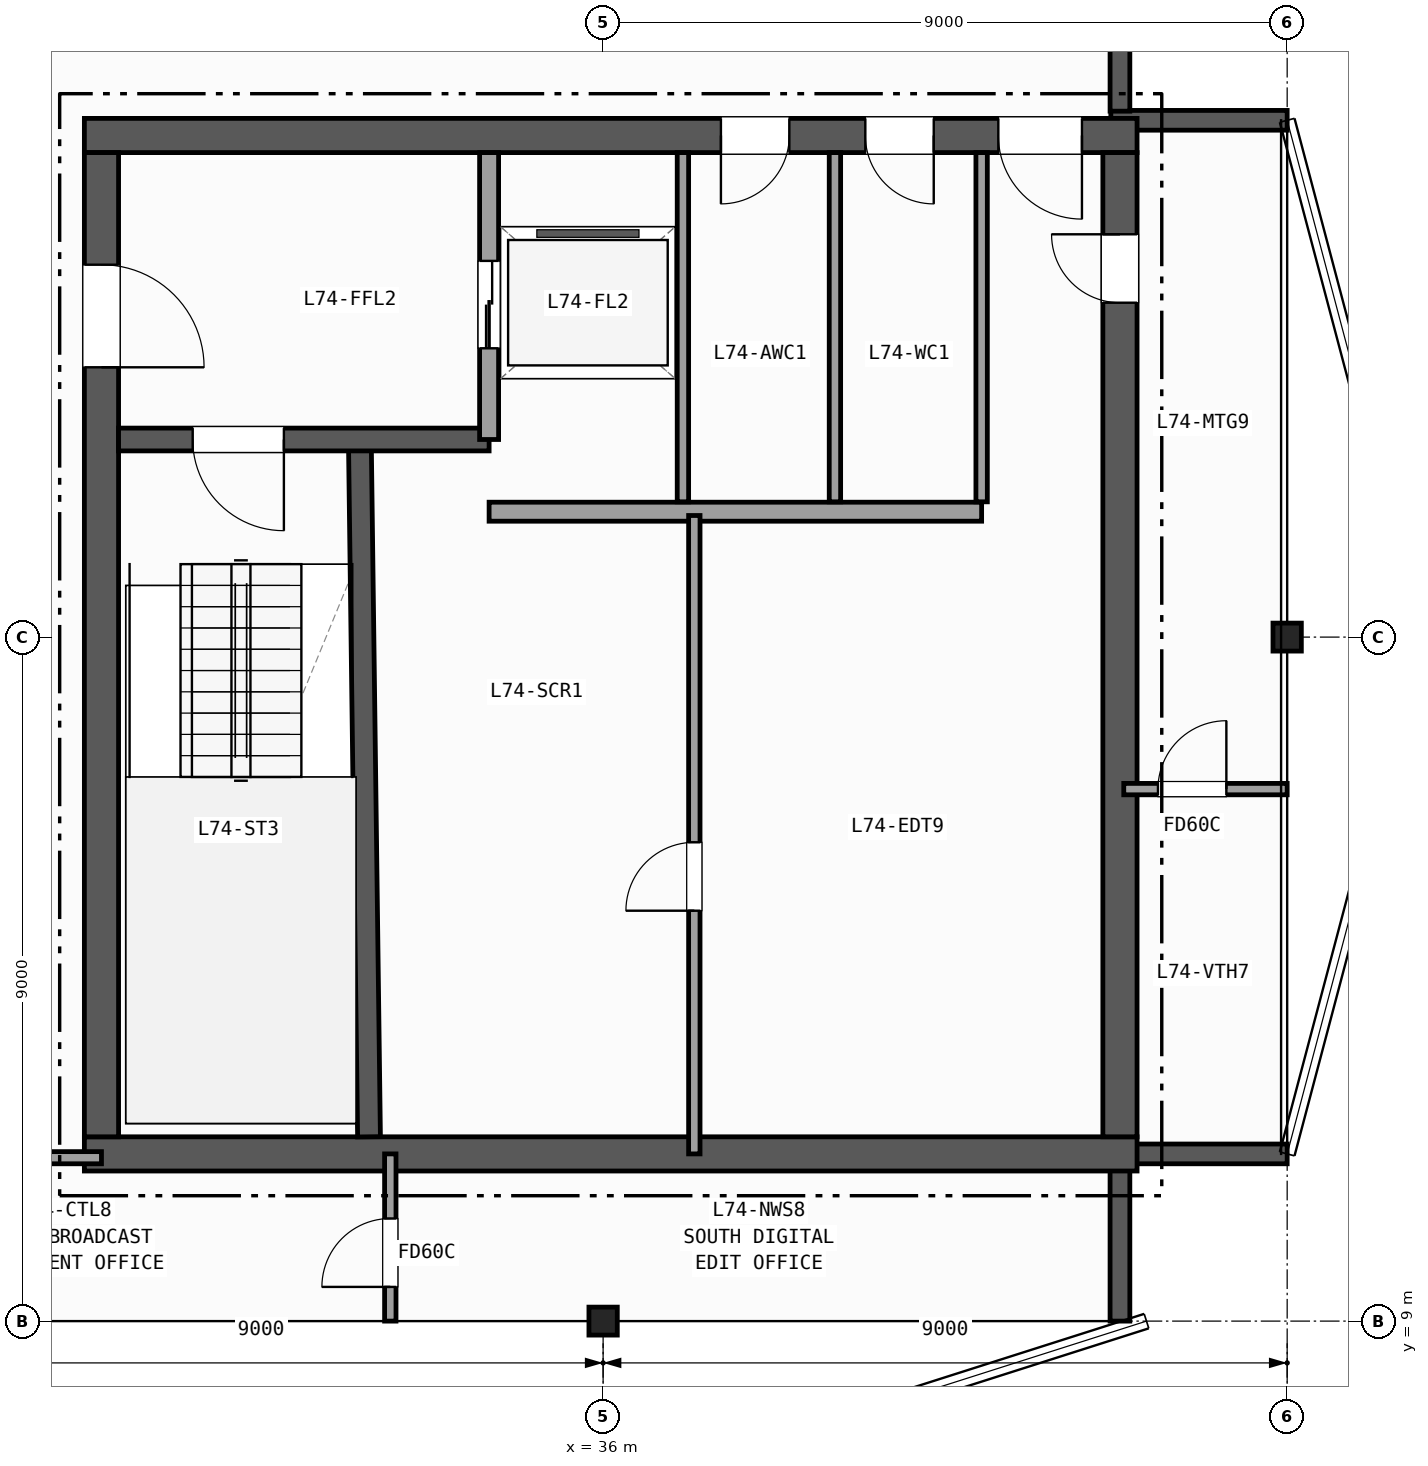
"""IFC4 building model, lengths in metres.
Left out: names, types, materials, properties, quantities, classifications, styles, units other than length and angle.
Written with IfcOpenShell. Run it as: python <this file> out.ifc"""

import sys

from ifc_helpers import new_model, si_unit, direction, frame, frame_2d, origin, origin_2d, place, context, subcontext, project, spatial, rectangle, i_section, extrude, element, fill, save


model = new_model("IFC4")
c1 = context("Model", 3, precision=1e-05, world=origin(), true_north=direction((0.0, 1.0)))
c2 = subcontext(c1, "Body", "Model", "MODEL_VIEW")
j1 = project(units=[si_unit("LENGTHUNIT", "METRE"), si_unit("PLANEANGLEUNIT", "RADIAN")], contexts=[c1])
p1 = place(None, origin())
s1 = spatial("IfcSite", under=j1, at=p1, CompositionType="ELEMENT")
p2 = place(p1, origin())
s2 = spatial("IfcBuilding", under=s1, at=p2, CompositionType="ELEMENT")
p3 = place(p2, frame((0.0, 0.0, 293.7)))
s3 = spatial("IfcBuildingStorey", under=s2, at=p3, CompositionType="ELEMENT", Elevation=293.7)
for number, where, z_axis, x_axis in (
    (1, (36.0, 9.0, 0.0), (0.0, 0.0, 1.0), (1.0, 0.0, 0.0)),
    (2, (45.0, 18.0, 0.0), (0.0, 0.0, 1.0), (1.0, 0.0, 0.0)),
):
    element("IfcColumn", number, at=place(p3, frame(where, z_axis=z_axis, x_axis=x_axis)), inside=s3, PredefinedType="COLUMN", context=c2, shape_type="SweptSolid", body=[
        extrude(i_section(OverallWidth=0.373, OverallDepth=0.368, WebThickness=0.015, FlangeThickness=0.024, FilletRadius=0.015, at=origin_2d()), origin(), (0.0, 0.0, 1.0), 3.7),
    ])
p4 = place(p3, frame((42.8, 9.0, 0.0), z_axis=(0.0, 0.0, 1.0), x_axis=(0.0, 1.0, 0.0)))
e3 = element("IfcWall", 3, at=p4, inside=s3, PredefinedType="SOLIDWALL", context=c2, shape_type="SweptSolid", body=[
    extrude(rectangle(XDim=2.08, YDim=0.26, at=frame_2d((1.04, 0.0))), origin(), (0.0, 0.0, 1.0), 3.37),
])
for number, where, z_axis, x_axis in (
    (4, (42.68, 11.2, 0.0), (0.0, 0.0, 1.0), (1.0, 0.0, 0.0)),
    (5, (45.0, 24.8, 0.0), (0.0, 0.0, 1.0), (-1.0, 0.0, 0.0)),
):
    element("IfcWall", number, at=place(p3, frame(where, z_axis=z_axis, x_axis=x_axis)), inside=s3, PredefinedType="SOLIDWALL", context=c2, shape_type="SweptSolid", body=[
        extrude(rectangle(XDim=2.32, YDim=0.26, at=frame_2d((1.16, 0.0))), origin(), (0.0, 0.0, 1.0), 3.37),
    ])
p5 = place(p3, frame((42.8, 24.92, 0.0), z_axis=(0.0, 0.0, 1.0), x_axis=(0.0, 1.0, 0.0)))
e6 = element("IfcWall", 6, at=p5, inside=s3, PredefinedType="SOLIDWALL", context=c2, shape_type="SweptSolid", body=[
    extrude(rectangle(XDim=2.08, YDim=0.26, at=frame_2d((1.04, 0.0))), origin(), (0.0, 0.0, 1.0), 3.37),
])
p6 = place(p3, frame((29.175, 11.2, 0.0), z_axis=(0.0, 0.0, 1.0), x_axis=(1.0, 0.0, 0.0)))
e7 = element("IfcWall", 7, at=p6, inside=s3, PredefinedType="SHEAR", context=c2, shape_type="SweptSolid", body=[
    extrude(rectangle(XDim=13.85, YDim=0.45, at=frame_2d((6.925, 0.0))), origin(), (0.0, 0.0, 1.0), 3.37),
])
p7 = place(p3, frame((43.025, 24.6, 0.0), z_axis=(0.0, 0.0, 1.0), x_axis=(-1.0, 0.0, 0.0)))
e8 = element("IfcWall", 8, at=p7, inside=s3, PredefinedType="SHEAR", context=c2, shape_type="SweptSolid", body=[
    extrude(rectangle(XDim=13.85, YDim=0.45, at=frame_2d((6.925, 0.0))), origin(), (0.0, 0.0, 1.0), 3.37),
])
p8 = place(p7, frame((0.725, 0.0, 0.0)))
e9 = element("IfcOpeningElement", 9, at=p8, cuts=e8, PredefinedType="OPENING", context=c2, shape_type="SweptSolid", body=[
    extrude(rectangle(XDim=1.1, YDim=2.15, at=frame_2d((0.55, 1.075))), frame((0.0, 0.235, 0.0), z_axis=(0.0, -1.0, 0.0), x_axis=(1.0, 0.0, 0.0)), (0.0, 0.0, 1.0), 0.47),
])
p9 = place(p7, frame((2.675, 0.0, 0.0)))
e10 = element("IfcOpeningElement", 10, at=p9, cuts=e8, PredefinedType="OPENING", context=c2, shape_type="SweptSolid", body=[
    extrude(rectangle(XDim=0.9, YDim=2.1, at=frame_2d((0.45, 1.05))), frame((0.0, 0.235, 0.0), z_axis=(0.0, -1.0, 0.0), x_axis=(1.0, 0.0, 0.0)), (0.0, 0.0, 1.0), 0.47),
])
p10 = place(p7, frame((4.575, 0.0, 0.0)))
e11 = element("IfcOpeningElement", 11, at=p10, cuts=e8, PredefinedType="OPENING", context=c2, shape_type="SweptSolid", body=[
    extrude(rectangle(XDim=0.9, YDim=2.1, at=frame_2d((0.45, 1.05))), frame((0.0, 0.235, 0.0), z_axis=(0.0, -1.0, 0.0), x_axis=(1.0, 0.0, 0.0)), (0.0, 0.0, 1.0), 0.47),
])
p11 = place(p3, frame((29.4, 24.375, 0.0), z_axis=(0.0, 0.0, 1.0), x_axis=(0.0, -1.0, 0.0)))
e12 = element("IfcWall", 12, at=p11, inside=s3, PredefinedType="SHEAR", context=c2, shape_type="SweptSolid", body=[
    extrude(rectangle(XDim=12.95, YDim=0.45, at=frame_2d((6.475, 0.0))), origin(), (0.0, 0.0, 1.0), 3.37),
])
p12 = place(p11, frame((1.475, 0.0, 0.0)))
e13 = element("IfcOpeningElement", 13, at=p12, cuts=e12, PredefinedType="OPENING", context=c2, shape_type="SweptSolid", body=[
    extrude(rectangle(XDim=1.35, YDim=2.15, at=frame_2d((0.675, 1.075))), frame((0.0, 0.235, 0.0), z_axis=(0.0, -1.0, 0.0), x_axis=(1.0, 0.0, 0.0)), (0.0, 0.0, 1.0), 0.47),
])
p13 = place(p3, frame((42.8, 11.425, 0.0), z_axis=(0.0, 0.0, 1.0), x_axis=(0.0, 1.0, 0.0)))
e14 = element("IfcWall", 14, at=p13, inside=s3, PredefinedType="SHEAR", context=c2, shape_type="SweptSolid", body=[
    extrude(rectangle(XDim=12.95, YDim=0.45, at=frame_2d((6.475, 0.0))), origin(), (0.0, 0.0, 1.0), 3.37),
])
p14 = place(p13, frame((10.975, 0.0, 0.0)))
e15 = element("IfcOpeningElement", 15, at=p14, cuts=e14, PredefinedType="OPENING", context=c2, shape_type="SweptSolid", body=[
    extrude(rectangle(XDim=0.9, YDim=2.1, at=frame_2d((0.45, 1.05))), frame((0.0, 0.235, 0.0), z_axis=(0.0, -1.0, 0.0), x_axis=(1.0, 0.0, 0.0)), (0.0, 0.0, 1.0), 0.47),
])
p15 = place(p3, frame((32.92, 11.425, 0.0), z_axis=(0.0, 0.0, 1.0), x_axis=(-0.013135638869, 0.999913723774, 0.0)))
e16 = element("IfcWall", 16, at=p15, inside=s3, PredefinedType="SHEAR", context=c2, shape_type="SweptSolid", body=[
    extrude(rectangle(XDim=9.126, YDim=0.3, at=frame_2d((4.563, 0.0))), origin(), (0.0, 0.0, 1.0), 3.37),
])
p16 = place(p3, frame((34.5, 20.6, 0.0), z_axis=(0.0, 0.0, 1.0), x_axis=(-1.0, 0.0, 0.0)))
e17 = element("IfcWall", 17, at=p16, inside=s3, PredefinedType="SHEAR", context=c2, shape_type="SweptSolid", body=[
    extrude(rectangle(XDim=4.875, YDim=0.3, at=frame_2d((2.438, 0.0))), origin(), (0.0, 0.0, 1.0), 3.37),
])
p17 = place(p16, frame((2.7, 0.0, 0.0)))
e18 = element("IfcOpeningElement", 18, at=p17, cuts=e17, PredefinedType="OPENING", context=c2, shape_type="SweptSolid", body=[
    extrude(rectangle(XDim=1.2, YDim=2.15, at=frame_2d((0.6, 1.075))), frame((0.0, 0.16, 0.0), z_axis=(0.0, -1.0, 0.0), x_axis=(1.0, 0.0, 0.0)), (0.0, 0.0, 1.0), 0.32),
])
p18 = place(p3, frame((34.5, 20.6, 0.0), z_axis=(0.0, 0.0, 1.0), x_axis=(0.0, 1.0, 0.0)))
e19 = element("IfcWall", 19, at=p18, inside=s3, PredefinedType="PARTITIONING", context=c2, shape_type="SweptSolid", body=[
    extrude(rectangle(XDim=3.775, YDim=0.25, at=frame_2d((1.887, 0.0))), origin(), (0.0, 0.0, 1.0), 3.37),
])
p19 = place(p18, frame((1.2, 0.0, 0.0)))
e20 = element("IfcOpeningElement", 20, at=p19, cuts=e19, PredefinedType="OPENING", context=c2, shape_type="SweptSolid", body=[
    extrude(rectangle(XDim=1.15, YDim=2.15, at=frame_2d((0.575, 1.075))), frame((0.0, 0.135, 0.0), z_axis=(0.0, -1.0, 0.0), x_axis=(1.0, 0.0, 0.0)), (0.0, 0.0, 1.0), 0.27),
])
p20 = place(p3, frame((34.5, 19.65, 0.0), z_axis=(0.0, 0.0, 1.0), x_axis=(1.0, 0.0, 0.0)))
e21 = element("IfcWall", 21, at=p20, inside=s3, PredefinedType="PARTITIONING", context=c2, shape_type="SweptSolid", body=[
    extrude(rectangle(XDim=6.48, YDim=0.25, at=frame_2d((3.24, 0.0))), origin(), (0.0, 0.0, 1.0), 3.37),
])
p21 = place(p3, frame((37.2, 11.2, 0.0), z_axis=(0.0, 0.0, 1.0), x_axis=(0.0, 1.0, 0.0)))
e22 = element("IfcWall", 22, at=p21, inside=s3, PredefinedType="PARTITIONING", context=c2, shape_type="SweptSolid", body=[
    extrude(rectangle(XDim=8.4, YDim=0.15, at=frame_2d((4.2, 0.0))), origin(), (0.0, 0.0, 1.0), 3.37),
])
p22 = place(p21, frame((3.2, 0.0, 0.0)))
e23 = element("IfcOpeningElement", 23, at=p22, cuts=e22, PredefinedType="OPENING", context=c2, shape_type="SweptSolid", body=[
    extrude(rectangle(XDim=0.9, YDim=2.1, at=frame_2d((0.45, 1.05))), frame((0.0, 0.085, 0.0), z_axis=(0.0, -1.0, 0.0), x_axis=(1.0, 0.0, 0.0)), (0.0, 0.0, 1.0), 0.17),
])
for number, where, z_axis, x_axis in (
    (24, (37.05, 19.78, 0.0), (0.0, 0.0, 1.0), (0.0, 1.0, 0.0)),
    (25, (39.05, 19.78, 0.0), (0.0, 0.0, 1.0), (0.0, 1.0, 0.0)),
    (26, (40.98, 19.78, 0.0), (0.0, 0.0, 1.0), (0.0, 1.0, 0.0)),
):
    element("IfcWall", number, at=place(p3, frame(where, z_axis=z_axis, x_axis=x_axis)), inside=s3, PredefinedType="PARTITIONING", context=c2, shape_type="SweptSolid", body=[
        extrude(rectangle(XDim=4.595, YDim=0.15, at=frame_2d((2.297, 0.0))), origin(), (0.0, 0.0, 1.0), 3.37),
    ])
p23 = place(p3, frame((24.65, 11.15, 0.0), z_axis=(0.0, 0.0, 1.0), x_axis=(1.0, 0.0, 0.0)))
e27 = element("IfcWall", 27, at=p23, inside=s3, PredefinedType="PARTITIONING", context=c2, shape_type="SweptSolid", body=[
    extrude(rectangle(XDim=4.75, YDim=0.16, at=frame_2d((2.375, 0.0))), origin(), (0.0, 0.0, 1.0), 2.742),
])
p24 = place(p23, frame((1.2, 0.0, 0.0)))
e28 = element("IfcOpeningElement", 28, at=p24, cuts=e27, PredefinedType="OPENING", context=c2, shape_type="SweptSolid", body=[
    extrude(rectangle(XDim=1.05, YDim=2.15, at=frame_2d((0.525, 1.075))), frame((0.0, 0.09, 0.0), z_axis=(0.0, -1.0, 0.0), x_axis=(1.0, 0.0, 0.0)), (0.0, 0.0, 1.0), 0.18),
])
p25 = place(p3, frame((33.2, 9.0, 0.0), z_axis=(0.0, 0.0, 1.0), x_axis=(0.0, 1.0, 0.0)))
e29 = element("IfcWall", 29, at=p25, inside=s3, PredefinedType="PARTITIONING", context=c2, shape_type="SweptSolid", body=[
    extrude(rectangle(XDim=2.2, YDim=0.15, at=frame_2d((1.1, 0.0))), origin(), (0.0, 0.0, 1.0), 2.657),
])
p26 = place(p25, frame((0.45, 0.0, 0.0)))
e30 = element("IfcOpeningElement", 30, at=p26, cuts=e29, PredefinedType="OPENING", context=c2, shape_type="SweptSolid", body=[
    extrude(rectangle(XDim=0.9, YDim=2.1, at=frame_2d((0.45, 1.05))), frame((0.0, 0.085, 0.0), z_axis=(0.0, -1.0, 0.0), x_axis=(1.0, 0.0, 0.0)), (0.0, 0.0, 1.0), 0.17),
])
p27 = place(p3, frame((42.85, 16.0, 0.0), z_axis=(0.0, 0.0, 1.0), x_axis=(1.0, 0.0, 0.0)))
e31 = element("IfcWall", 31, at=p27, inside=s3, PredefinedType="PARTITIONING", context=c2, shape_type="SweptSolid", body=[
    extrude(rectangle(XDim=2.15, YDim=0.15, at=frame_2d((1.075, 0.0))), origin(), (0.0, 0.0, 1.0), 3.37),
])
p28 = place(p27, frame((0.45, 0.0, 0.0)))
e32 = element("IfcOpeningElement", 32, at=p28, cuts=e31, PredefinedType="OPENING", context=c2, shape_type="SweptSolid", body=[
    extrude(rectangle(XDim=0.9, YDim=2.1, at=frame_2d((0.45, 1.05))), frame((0.0, 0.085, 0.0), z_axis=(0.0, -1.0, 0.0), x_axis=(1.0, 0.0, 0.0)), (0.0, 0.0, 1.0), 0.17),
])
p29 = place(p17, origin())
e33 = element("IfcDoor", 33, at=p29, inside=s3, OperationType="SINGLE_SWING_LEFT", PredefinedType="DOOR", context=c2, shape_type="SweptSolid", body=[
    extrude(rectangle(XDim=1.2, YDim=2.15, at=frame_2d((0.6, 1.075))), frame((0.0, 0.025, 0.0), z_axis=(0.0, -1.0, 0.0), x_axis=(1.0, 0.0, 0.0)), (0.0, 0.0, 1.0), 0.05),
])
fill(e18, e33)
p30 = place(p12, origin())
e34 = element("IfcDoor", 34, at=p30, inside=s3, OperationType="SINGLE_SWING_RIGHT", PredefinedType="DOOR", context=c2, shape_type="SweptSolid", body=[
    extrude(rectangle(XDim=1.35, YDim=2.15, at=frame_2d((0.675, 1.075))), frame((0.0, 0.025, 0.0), z_axis=(0.0, -1.0, 0.0), x_axis=(1.0, 0.0, 0.0)), (0.0, 0.0, 1.0), 0.05),
])
fill(e13, e34)
p31 = place(p14, origin())
e35 = element("IfcDoor", 35, at=p31, inside=s3, OperationType="SINGLE_SWING_RIGHT", PredefinedType="DOOR", context=c2, shape_type="SweptSolid", body=[
    extrude(rectangle(XDim=0.9, YDim=2.1, at=frame_2d((0.45, 1.05))), frame((0.0, 0.025, 0.0), z_axis=(0.0, -1.0, 0.0), x_axis=(1.0, 0.0, 0.0)), (0.0, 0.0, 1.0), 0.05),
])
fill(e15, e35)
p32 = place(p8, origin())
e36 = element("IfcDoor", 36, at=p32, inside=s3, OperationType="SINGLE_SWING_LEFT", PredefinedType="DOOR", context=c2, shape_type="SweptSolid", body=[
    extrude(rectangle(XDim=1.1, YDim=2.15, at=frame_2d((0.55, 1.075))), frame((0.0, 0.025, 0.0), z_axis=(0.0, -1.0, 0.0), x_axis=(1.0, 0.0, 0.0)), (0.0, 0.0, 1.0), 0.05),
])
fill(e9, e36)
p33 = place(p9, origin())
e37 = element("IfcDoor", 37, at=p33, inside=s3, OperationType="SINGLE_SWING_LEFT", PredefinedType="DOOR", context=c2, shape_type="SweptSolid", body=[
    extrude(rectangle(XDim=0.9, YDim=2.1, at=frame_2d((0.45, 1.05))), frame((0.0, 0.025, 0.0), z_axis=(0.0, -1.0, 0.0), x_axis=(1.0, 0.0, 0.0)), (0.0, 0.0, 1.0), 0.05),
])
fill(e10, e37)
p34 = place(p10, origin())
e38 = element("IfcDoor", 38, at=p34, inside=s3, OperationType="SINGLE_SWING_RIGHT", PredefinedType="DOOR", context=c2, shape_type="SweptSolid", body=[
    extrude(rectangle(XDim=0.9, YDim=2.1, at=frame_2d((0.45, 1.05))), frame((0.0, 0.025, 0.0), z_axis=(0.0, -1.0, 0.0), x_axis=(1.0, 0.0, 0.0)), (0.0, 0.0, 1.0), 0.05),
])
fill(e11, e38)
p35 = place(p19, origin())
e39 = element("IfcDoor", 39, at=p35, inside=s3, OperationType="DOUBLE_DOOR_SLIDING", PredefinedType="DOOR", context=c2, shape_type="SweptSolid", body=[
    extrude(rectangle(XDim=1.15, YDim=2.15, at=frame_2d((0.575, 1.075))), frame((0.0, 0.025, 0.0), z_axis=(0.0, -1.0, 0.0), x_axis=(1.0, 0.0, 0.0)), (0.0, 0.0, 1.0), 0.05),
])
fill(e20, e39)
p36 = place(p22, origin())
e40 = element("IfcDoor", 40, at=p36, inside=s3, OperationType="SINGLE_SWING_LEFT", PredefinedType="DOOR", context=c2, shape_type="SweptSolid", body=[
    extrude(rectangle(XDim=0.9, YDim=2.1, at=frame_2d((0.45, 1.05))), frame((0.0, 0.025, 0.0), z_axis=(0.0, -1.0, 0.0), x_axis=(1.0, 0.0, 0.0)), (0.0, 0.0, 1.0), 0.05),
])
fill(e23, e40)
p37 = place(p26, origin())
e41 = element("IfcDoor", 41, at=p37, inside=s3, OperationType="SINGLE_SWING_LEFT", PredefinedType="DOOR", context=c2, shape_type="SweptSolid", body=[
    extrude(rectangle(XDim=0.9, YDim=2.1, at=frame_2d((0.45, 1.05))), frame((0.0, 0.025, 0.0), z_axis=(0.0, -1.0, 0.0), x_axis=(1.0, 0.0, 0.0)), (0.0, 0.0, 1.0), 0.05),
])
fill(e30, e41)
p38 = place(p28, origin())
e42 = element("IfcDoor", 42, at=p38, inside=s3, OperationType="SINGLE_SWING_RIGHT", PredefinedType="DOOR", context=c2, shape_type="SweptSolid", body=[
    extrude(rectangle(XDim=0.9, YDim=2.1, at=frame_2d((0.45, 1.05))), frame((0.0, 0.025, 0.0), z_axis=(0.0, -1.0, 0.0), x_axis=(1.0, 0.0, 0.0)), (0.0, 0.0, 1.0), 0.05),
])
fill(e32, e42)
save(model, sys.argv[1])
